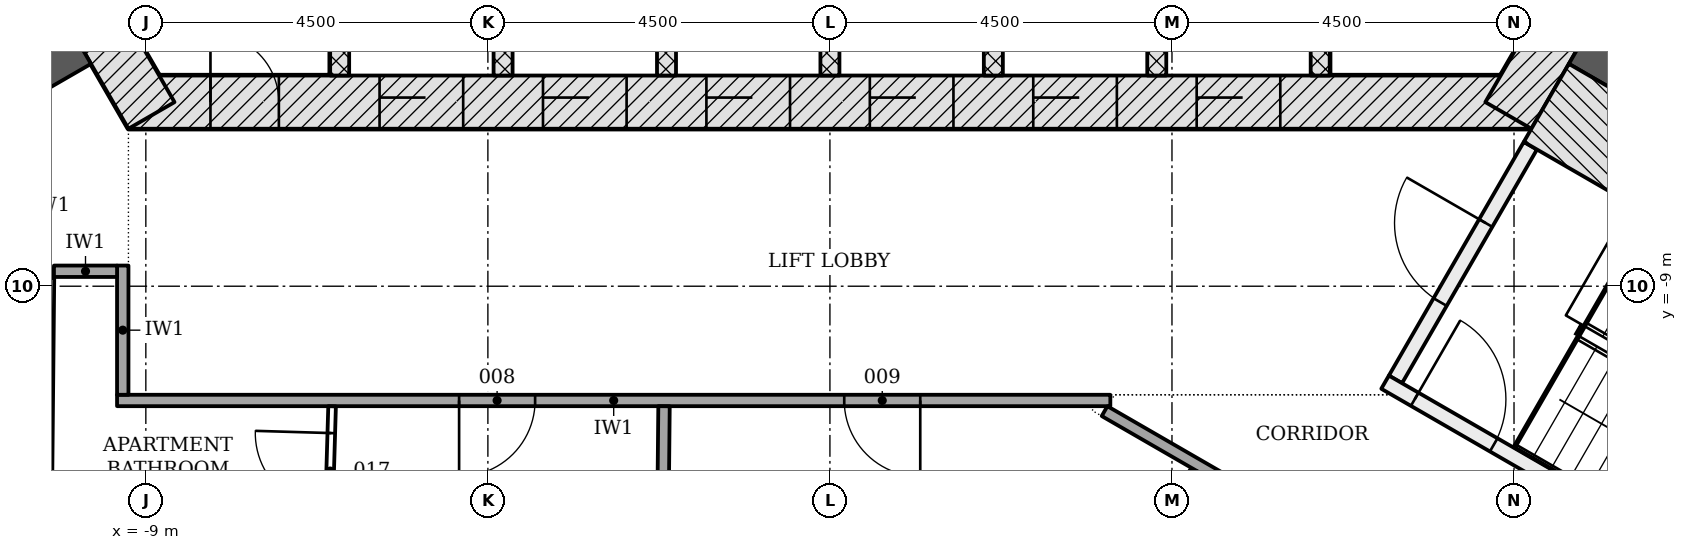
"""IFC4 building model, lengths in metres.
Left out: names, types, materials, properties, quantities, classifications, styles, units other than length and angle.
Written with IfcOpenShell. Run it as: python <this file> out.ifc"""

import sys

from ifc_helpers import new_model, si_unit, direction, frame, frame_2d, origin, place, context, subcontext, project, spatial, rectangle, extrude, element, fill, save


model = new_model("IFC4")
c1 = context("Model", 3, precision=1e-05, world=origin(), true_north=direction((0.0, 1.0)))
c2 = subcontext(c1, "Body", "Model", "MODEL_VIEW")
j1 = project(units=[si_unit("LENGTHUNIT", "METRE"), si_unit("PLANEANGLEUNIT", "RADIAN")], contexts=[c1])
p1 = place(None, origin())
s1 = spatial("IfcSite", under=j1, at=p1, CompositionType="ELEMENT")
p2 = place(p1, origin())
s2 = spatial("IfcBuilding", under=s1, at=p2, CompositionType="ELEMENT")
p3 = place(p2, frame((0.0, 0.0, 98.7)))
s3 = spatial("IfcBuildingStorey", under=s2, at=p3, CompositionType="ELEMENT", Elevation=98.7)
p4 = place(p3, frame((-9.229, -6.578, -0.2), z_axis=(0.0, 0.0, 1.0), x_axis=(1.0, 0.0, 0.0)))
e1 = element("IfcWall", 1, at=p4, inside=s3, PredefinedType="SHEAR", context=c2, shape_type="SweptSolid", body=[
    extrude(rectangle(XDim=18.458, YDim=0.7, at=frame_2d((9.229, 0.0))), origin(), (0.0, 0.0, 1.0), 3.6),
])
p5 = place(p4, frame((3.304, 0.0, 0.2)))
e2 = element("IfcOpeningElement", 2, at=p5, cuts=e1, PredefinedType="OPENING", context=c2, shape_type="SweptSolid", body=[
    extrude(rectangle(XDim=1.1, YDim=2.1, at=frame_2d((0.55, 1.05))), frame((0.0, 0.36, 0.0), z_axis=(0.0, -1.0, 0.0), x_axis=(1.0, 0.0, 0.0)), (0.0, 0.0, 1.0), 0.72),
])
p6 = place(p4, frame((5.454, 0.0, 0.2)))
e3 = element("IfcOpeningElement", 3, at=p6, cuts=e1, PredefinedType="OPENING", context=c2, shape_type="SweptSolid", body=[
    extrude(rectangle(XDim=1.1, YDim=2.1, at=frame_2d((0.55, 1.05))), frame((0.0, 0.36, 0.0), z_axis=(0.0, -1.0, 0.0), x_axis=(1.0, 0.0, 0.0)), (0.0, 0.0, 1.0), 0.72),
])
p7 = place(p4, frame((7.604, 0.0, 0.2)))
e4 = element("IfcOpeningElement", 4, at=p7, cuts=e1, PredefinedType="OPENING", context=c2, shape_type="SweptSolid", body=[
    extrude(rectangle(XDim=1.1, YDim=2.1, at=frame_2d((0.55, 1.05))), frame((0.0, 0.36, 0.0), z_axis=(0.0, -1.0, 0.0), x_axis=(1.0, 0.0, 0.0)), (0.0, 0.0, 1.0), 0.72),
])
p8 = place(p4, frame((9.754, 0.0, 0.2)))
e5 = element("IfcOpeningElement", 5, at=p8, cuts=e1, PredefinedType="OPENING", context=c2, shape_type="SweptSolid", body=[
    extrude(rectangle(XDim=1.1, YDim=2.1, at=frame_2d((0.55, 1.05))), frame((0.0, 0.36, 0.0), z_axis=(0.0, -1.0, 0.0), x_axis=(1.0, 0.0, 0.0)), (0.0, 0.0, 1.0), 0.72),
])
p9 = place(p4, frame((11.904, 0.0, 0.2)))
e6 = element("IfcOpeningElement", 6, at=p9, cuts=e1, PredefinedType="OPENING", context=c2, shape_type="SweptSolid", body=[
    extrude(rectangle(XDim=1.1, YDim=2.1, at=frame_2d((0.55, 1.05))), frame((0.0, 0.36, 0.0), z_axis=(0.0, -1.0, 0.0), x_axis=(1.0, 0.0, 0.0)), (0.0, 0.0, 1.0), 0.72),
])
p10 = place(p4, frame((14.054, 0.0, 0.2)))
e7 = element("IfcOpeningElement", 7, at=p10, cuts=e1, PredefinedType="OPENING", context=c2, shape_type="SweptSolid", body=[
    extrude(rectangle(XDim=1.1, YDim=2.1, at=frame_2d((0.55, 1.05))), frame((0.0, 0.36, 0.0), z_axis=(0.0, -1.0, 0.0), x_axis=(1.0, 0.0, 0.0)), (0.0, 0.0, 1.0), 0.72),
])
p11 = place(p4, frame((1.079, 0.0, 0.2)))
e8 = element("IfcOpeningElement", 8, at=p11, cuts=e1, PredefinedType="OPENING", context=c2, shape_type="SweptSolid", body=[
    extrude(rectangle(XDim=0.9, YDim=2.1, at=frame_2d((0.45, 1.05))), frame((0.0, 0.36, 0.0), z_axis=(0.0, -1.0, 0.0), x_axis=(1.0, 0.0, 0.0)), (0.0, 0.0, 1.0), 0.72),
])
for number, where, z_axis, x_axis in (
    (9, (8.926, -6.753, -0.2), (0.0, 0.0, 1.0), (0.5, 0.866, 0.0)),
    (10, (-10.311, -4.353, -0.2), (0.0, 0.0, 1.0), (0.5, -0.866, 0.0)),
):
    element("IfcWall", number, at=place(p3, frame(where, z_axis=z_axis, x_axis=x_axis)), inside=s3, PredefinedType="SHEAR", context=c2, shape_type="SweptSolid", body=[
        extrude(rectangle(XDim=2.771, YDim=0.7, at=frame_2d((1.386, 0.0))), origin(), (0.0, 0.0, 1.0), 3.6),
    ])
for number, where, z_axis, x_axis in (
    (11, (-9.922, -5.728, -0.2), (0.0, 0.0, 1.0), (-0.866, -0.5, 0.0)),
    (12, (9.922, -5.728, -0.2), (0.0, 0.0, 1.0), (0.866, -0.5, 0.0)),
):
    element("IfcWall", number, at=place(p3, frame(where, z_axis=z_axis, x_axis=x_axis)), inside=s3, PredefinedType="SHEAR", context=c2, shape_type="SweptSolid", body=[
        extrude(rectangle(XDim=12.677, YDim=0.8, at=frame_2d((6.339, 0.0))), origin(), (0.0, 0.0, 1.0), 3.6),
    ])
for number, where, z_axis, x_axis in (
    (13, (-6.45, -6.228, -0.2), (0.0, 0.0, 1.0), (0.0, 1.0, 0.0)),
    (14, (-4.3, -6.228, -0.2), (0.0, 0.0, 1.0), (0.0, 1.0, 0.0)),
    (15, (-2.15, -6.228, -0.2), (0.0, 0.0, 1.0), (0.0, 1.0, 0.0)),
    (16, (0.0, -6.228, -0.2), (0.0, 0.0, 1.0), (0.0, 1.0, 0.0)),
    (17, (2.15, -6.228, -0.2), (0.0, 0.0, 1.0), (0.0, 1.0, 0.0)),
    (18, (4.3, -6.228, -0.2), (0.0, 0.0, 1.0), (0.0, 1.0, 0.0)),
    (19, (6.45, -6.228, -0.2), (0.0, 0.0, 1.0), (0.0, 1.0, 0.0)),
):
    element("IfcWall", number, at=place(p3, frame(where, z_axis=z_axis, x_axis=x_axis)), inside=s3, PredefinedType="PARTITIONING", context=c2, shape_type="SweptSolid", body=[
        extrude(rectangle(XDim=2.5, YDim=0.25, at=frame_2d((1.25, 0.0))), origin(), (0.0, 0.0, 1.0), 3.6),
    ])
p12 = place(p3, frame((-10.418, -4.868, -0.2), z_axis=(0.0, 0.0, 1.0), x_axis=(-0.866018442252, -0.500012057535, 0.0)))
e20 = element("IfcWall", 20, at=p12, inside=s3, PredefinedType="SHEAR", context=c2, shape_type="SweptSolid", body=[
    extrude(rectangle(XDim=7.2, YDim=1.186, at=frame_2d((3.6, 0.0))), origin(), (0.0, 0.0, 1.0), 3.6),
])
p13 = place(p3, frame((7.44, -10.226, -0.2), z_axis=(0.0, 0.0, 1.0), x_axis=(0.500022077904, 0.866012656725, 0.0)))
e21 = element("IfcWall", 21, at=p13, inside=s3, PredefinedType="SHEAR", context=c2, shape_type="SweptSolid", body=[
    extrude(rectangle(XDim=3.55, YDim=0.2, at=frame_2d((1.775, 0.0))), origin(), (0.0, 0.0, 1.0), 3.6),
])
p14 = place(p13, frame((1.175, 0.0, 0.2)))
e22 = element("IfcOpeningElement", 22, at=p14, cuts=e21, PredefinedType="OPENING", context=c2, shape_type="SweptSolid", body=[
    extrude(rectangle(XDim=1.2, YDim=2.1, at=frame_2d((0.6, 1.05))), frame((0.0, 0.11, 0.0), z_axis=(0.0, -1.0, 0.0), x_axis=(1.0, 0.0, 0.0)), (0.0, 0.0, 1.0), 0.22),
])
p15 = place(p3, frame((7.304, -10.262, -0.2), z_axis=(0.0, 0.0, 1.0), x_axis=(0.866026594901, -0.49999793692, 0.0)))
e23 = element("IfcWall", 23, at=p15, inside=s3, PredefinedType="SHEAR", context=c2, shape_type="SweptSolid", body=[
    extrude(rectangle(XDim=5.6, YDim=0.2, at=frame_2d((2.8, 0.0))), origin(), (0.0, 0.0, 1.0), 3.6),
])
p16 = place(p15, frame((0.45, 0.0, 0.2)))
e24 = element("IfcOpeningElement", 24, at=p16, cuts=e23, PredefinedType="OPENING", context=c2, shape_type="SweptSolid", body=[
    extrude(rectangle(XDim=1.2, YDim=2.1, at=frame_2d((0.6, 1.05))), frame((0.0, 0.11, 0.0), z_axis=(0.0, -1.0, 0.0), x_axis=(1.0, 0.0, 0.0)), (0.0, 0.0, 1.0), 0.22),
])
p17 = place(p3, frame((9.425, -6.588, -0.2), z_axis=(0.0, 0.0, 1.0), x_axis=(0.866018442252, -0.500012057535, 0.0)))
e25 = element("IfcWall", 25, at=p17, inside=s3, PredefinedType="SHEAR", context=c2, shape_type="SweptSolid", body=[
    extrude(rectangle(XDim=7.2, YDim=1.186, at=frame_2d((3.6, 0.0))), origin(), (0.0, 0.0, 1.0), 3.6),
])
p18 = place(p3, frame((3.689, -10.503, 0.0), z_axis=(0.0, 0.0, 1.0), x_axis=(-1.0, 0.0, 0.0)))
e26 = element("IfcWall", 26, at=p18, inside=s3, PredefinedType="PARTITIONING", context=c2, shape_type="SweptSolid", body=[
    extrude(rectangle(XDim=13.068, YDim=0.15, at=frame_2d((6.534, 0.0))), origin(), (0.0, 0.0, 1.0), 2.778),
])
p19 = place(p18, frame((7.568, 0.0, 0.0)))
e27 = element("IfcOpeningElement", 27, at=p19, cuts=e26, PredefinedType="OPENING", context=c2, shape_type="SweptSolid", body=[
    extrude(rectangle(XDim=1.0, YDim=2.1, at=frame_2d((0.5, 1.05))), frame((0.0, 0.085, 0.0), z_axis=(0.0, -1.0, 0.0), x_axis=(1.0, 0.0, 0.0)), (0.0, 0.0, 1.0), 0.17),
])
p20 = place(p18, frame((2.501, 0.0, 0.0)))
e28 = element("IfcOpeningElement", 28, at=p20, cuts=e26, PredefinedType="OPENING", context=c2, shape_type="SweptSolid", body=[
    extrude(rectangle(XDim=1.0, YDim=2.1, at=frame_2d((0.5, 1.05))), frame((0.0, 0.085, 0.0), z_axis=(0.0, -1.0, 0.0), x_axis=(1.0, 0.0, 0.0)), (0.0, 0.0, 1.0), 0.17),
])
p21 = place(p3, frame((3.613, -10.643, 0.0), z_axis=(0.0, 0.0, 1.0), x_axis=(0.866042728627, -0.499969991291, 0.0)))
e29 = element("IfcWall", 29, at=p21, inside=s3, PredefinedType="PARTITIONING", context=c2, shape_type="SweptSolid", body=[
    extrude(rectangle(XDim=5.805, YDim=0.15, at=frame_2d((2.903, 0.0))), origin(), (0.0, 0.0, 1.0), 2.778),
])
p22 = place(p3, frame((-11.345, -7.012, 0.0), z_axis=(0.0, 0.0, 1.0), x_axis=(0.499998569178, -0.866026229868, 0.0)))
e30 = element("IfcWall", 30, at=p22, inside=s3, PredefinedType="PARTITIONING", context=c2, shape_type="SweptSolid", body=[
    extrude(rectangle(XDim=2.143, YDim=0.15, at=frame_2d((1.072, 0.0))), origin(), (0.0, 0.0, 1.0), 2.778),
])
p23 = place(p3, frame((-9.304, -10.428, 0.0), z_axis=(0.0, 0.0, 1.0), x_axis=(0.0, 1.0, 0.0)))
e31 = element("IfcWall", 31, at=p23, inside=s3, PredefinedType="PARTITIONING", context=c2, shape_type="SweptSolid", body=[
    extrude(rectangle(XDim=1.7, YDim=0.15, at=frame_2d((0.85, 0.0))), origin(), (0.0, 0.0, 1.0), 3.4),
])
p24 = place(p3, frame((-10.209, -8.803, 0.0), z_axis=(0.0, 0.0, 1.0), x_axis=(1.0, 0.0, 0.0)))
e32 = element("IfcWall", 32, at=p24, inside=s3, PredefinedType="PARTITIONING", context=c2, shape_type="SweptSolid", body=[
    extrude(rectangle(XDim=0.83, YDim=0.15, at=frame_2d((0.415, 0.0))), origin(), (0.0, 0.0, 1.0), 3.4),
])
p25 = place(p3, frame((-2.242, -16.616, 0.0), z_axis=(0.0, 0.0, 1.0), x_axis=(0.009866078621, 0.999951329062, 0.0)))
e33 = element("IfcWall", 33, at=p25, inside=s3, PredefinedType="PARTITIONING", context=c2, shape_type="SweptSolid", body=[
    extrude(rectangle(XDim=6.038, YDim=0.15, at=frame_2d((3.019, 0.0))), origin(), (0.0, 0.0, 1.0), 2.778),
])
p26 = place(p3, frame((-6.725, -16.528, 0.0), z_axis=(0.0, 0.0, 1.0), x_axis=(0.029495492599, 0.999564913308, 0.0)))
e34 = element("IfcWall", 34, at=p26, inside=s3, PredefinedType="PARTITIONING", context=c2, shape_type="SweptSolid", body=[
    extrude(rectangle(XDim=5.951, YDim=0.1, at=frame_2d((2.976, 0.0))), origin(), (0.0, 0.0, 1.0), 2.778),
])
p27 = place(p26, frame((4.598, 0.0, 0.0)))
e35 = element("IfcOpeningElement", 35, at=p27, cuts=e34, PredefinedType="OPENING", context=c2, shape_type="SweptSolid", body=[
    extrude(rectangle(XDim=1.0, YDim=2.1, at=frame_2d((0.5, 1.05))), frame((0.0, 0.06, 0.0), z_axis=(0.0, -1.0, 0.0), x_axis=(1.0, 0.0, 0.0)), (0.0, 0.0, 1.0), 0.12),
])
p28 = place(p26, frame((1.635, 0.0, 0.0)))
e36 = element("IfcOpeningElement", 36, at=p28, cuts=e34, PredefinedType="OPENING", context=c2, shape_type="SweptSolid", body=[
    extrude(rectangle(XDim=1.0, YDim=2.1, at=frame_2d((0.5, 1.05))), frame((0.0, 0.06, 0.0), z_axis=(0.0, -1.0, 0.0), x_axis=(1.0, 0.0, 0.0)), (0.0, 0.0, 1.0), 0.12),
])
p29 = place(p3, frame((-10.288, -12.186, 0.0), z_axis=(0.0, 0.0, 1.0), x_axis=(0.009841169114, 0.999951574523, 0.0)))
e37 = element("IfcWall", 37, at=p29, inside=s3, PredefinedType="PARTITIONING", context=c2, shape_type="SweptSolid", body=[
    extrude(rectangle(XDim=3.3, YDim=0.1, at=frame_2d((1.65, 0.0))), origin(), (0.0, 0.0, 1.0), 3.4),
])
p30 = place(p3, frame((4.782, -11.426, 0.0), z_axis=(0.0, 0.0, 1.0), x_axis=(-0.14392103122, -0.989589175756, 0.0)))
e38 = element("IfcWall", 38, at=p30, inside=s3, PredefinedType="PARTITIONING", context=c2, shape_type="SweptSolid", body=[
    extrude(rectangle(XDim=2.311, YDim=0.1, at=frame_2d((1.155, 0.0))), origin(), (0.0, 0.0, 1.0), 3.4),
])
p31 = place(p5, origin())
e39 = element("IfcDoor", 39, at=p31, inside=s3, OperationType="DOUBLE_DOOR_SLIDING", PredefinedType="DOOR", context=c2, shape_type="SweptSolid", body=[
    extrude(rectangle(XDim=1.1, YDim=2.1, at=frame_2d((0.55, 1.05))), frame((0.0, 0.025, 0.0), z_axis=(0.0, -1.0, 0.0), x_axis=(1.0, 0.0, 0.0)), (0.0, 0.0, 1.0), 0.05),
])
fill(e2, e39)
p32 = place(p6, origin())
e40 = element("IfcDoor", 40, at=p32, inside=s3, OperationType="DOUBLE_DOOR_SLIDING", PredefinedType="DOOR", context=c2, shape_type="SweptSolid", body=[
    extrude(rectangle(XDim=1.1, YDim=2.1, at=frame_2d((0.55, 1.05))), frame((0.0, 0.025, 0.0), z_axis=(0.0, -1.0, 0.0), x_axis=(1.0, 0.0, 0.0)), (0.0, 0.0, 1.0), 0.05),
])
fill(e3, e40)
p33 = place(p7, origin())
e41 = element("IfcDoor", 41, at=p33, inside=s3, OperationType="DOUBLE_DOOR_SLIDING", PredefinedType="DOOR", context=c2, shape_type="SweptSolid", body=[
    extrude(rectangle(XDim=1.1, YDim=2.1, at=frame_2d((0.55, 1.05))), frame((0.0, 0.025, 0.0), z_axis=(0.0, -1.0, 0.0), x_axis=(1.0, 0.0, 0.0)), (0.0, 0.0, 1.0), 0.05),
])
fill(e4, e41)
p34 = place(p8, origin())
e42 = element("IfcDoor", 42, at=p34, inside=s3, OperationType="DOUBLE_DOOR_SLIDING", PredefinedType="DOOR", context=c2, shape_type="SweptSolid", body=[
    extrude(rectangle(XDim=1.1, YDim=2.1, at=frame_2d((0.55, 1.05))), frame((0.0, 0.025, 0.0), z_axis=(0.0, -1.0, 0.0), x_axis=(1.0, 0.0, 0.0)), (0.0, 0.0, 1.0), 0.05),
])
fill(e5, e42)
p35 = place(p9, origin())
e43 = element("IfcDoor", 43, at=p35, inside=s3, OperationType="DOUBLE_DOOR_SLIDING", PredefinedType="DOOR", context=c2, shape_type="SweptSolid", body=[
    extrude(rectangle(XDim=1.1, YDim=2.1, at=frame_2d((0.55, 1.05))), frame((0.0, 0.025, 0.0), z_axis=(0.0, -1.0, 0.0), x_axis=(1.0, 0.0, 0.0)), (0.0, 0.0, 1.0), 0.05),
])
fill(e6, e43)
p36 = place(p10, origin())
e44 = element("IfcDoor", 44, at=p36, inside=s3, OperationType="DOUBLE_DOOR_SLIDING", PredefinedType="DOOR", context=c2, shape_type="SweptSolid", body=[
    extrude(rectangle(XDim=1.1, YDim=2.1, at=frame_2d((0.55, 1.05))), frame((0.0, 0.025, 0.0), z_axis=(0.0, -1.0, 0.0), x_axis=(1.0, 0.0, 0.0)), (0.0, 0.0, 1.0), 0.05),
])
fill(e7, e44)
p37 = place(p11, origin())
e45 = element("IfcDoor", 45, at=p37, inside=s3, OperationType="SINGLE_SWING_LEFT", PredefinedType="DOOR", context=c2, shape_type="SweptSolid", body=[
    extrude(rectangle(XDim=0.9, YDim=2.1, at=frame_2d((0.45, 1.05))), frame((0.0, 0.075, 0.0), z_axis=(0.0, -1.0, 0.0), x_axis=(1.0, 0.0, 0.0)), (0.0, 0.0, 1.0), 0.15),
])
fill(e8, e45)
p38 = place(p14, origin())
e46 = element("IfcDoor", 46, at=p38, inside=s3, OperationType="SINGLE_SWING_RIGHT", PredefinedType="DOOR", context=c2, shape_type="SweptSolid", body=[
    extrude(rectangle(XDim=1.2, YDim=2.1, at=frame_2d((0.6, 1.05))), frame((0.0, 0.025, 0.0), z_axis=(0.0, -1.0, 0.0), x_axis=(1.0, 0.0, 0.0)), (0.0, 0.0, 1.0), 0.05),
])
fill(e22, e46)
p39 = place(p16, origin())
e47 = element("IfcDoor", 47, at=p39, inside=s3, OperationType="SINGLE_SWING_LEFT", PredefinedType="DOOR", context=c2, shape_type="SweptSolid", body=[
    extrude(rectangle(XDim=1.2, YDim=2.1, at=frame_2d((0.6, 1.05))), frame((0.0, 0.025, 0.0), z_axis=(0.0, -1.0, 0.0), x_axis=(1.0, 0.0, 0.0)), (0.0, 0.0, 1.0), 0.05),
])
fill(e24, e47)
p40 = place(p19, origin())
e48 = element("IfcDoor", 48, at=p40, inside=s3, OperationType="SINGLE_SWING_RIGHT", PredefinedType="DOOR", context=c2, shape_type="SweptSolid", body=[
    extrude(rectangle(XDim=1.0, YDim=2.1, at=frame_2d((0.5, 1.05))), frame((0.0, 0.025, 0.0), z_axis=(0.0, -1.0, 0.0), x_axis=(1.0, 0.0, 0.0)), (0.0, 0.0, 1.0), 0.05),
])
fill(e27, e48)
p41 = place(p20, origin())
e49 = element("IfcDoor", 49, at=p41, inside=s3, OperationType="SINGLE_SWING_LEFT", PredefinedType="DOOR", context=c2, shape_type="SweptSolid", body=[
    extrude(rectangle(XDim=1.0, YDim=2.1, at=frame_2d((0.5, 1.05))), frame((0.0, 0.025, 0.0), z_axis=(0.0, -1.0, 0.0), x_axis=(1.0, 0.0, 0.0)), (0.0, 0.0, 1.0), 0.05),
])
fill(e28, e49)
p42 = place(p27, origin())
e50 = element("IfcDoor", 50, at=p42, inside=s3, OperationType="SINGLE_SWING_RIGHT", PredefinedType="DOOR", context=c2, shape_type="SweptSolid", body=[
    extrude(rectangle(XDim=1.0, YDim=2.1, at=frame_2d((0.5, 1.05))), frame((0.0, 0.025, 0.0), z_axis=(0.0, -1.0, 0.0), x_axis=(1.0, 0.0, 0.0)), (0.0, 0.0, 1.0), 0.05),
])
fill(e35, e50)
save(model, sys.argv[1])
